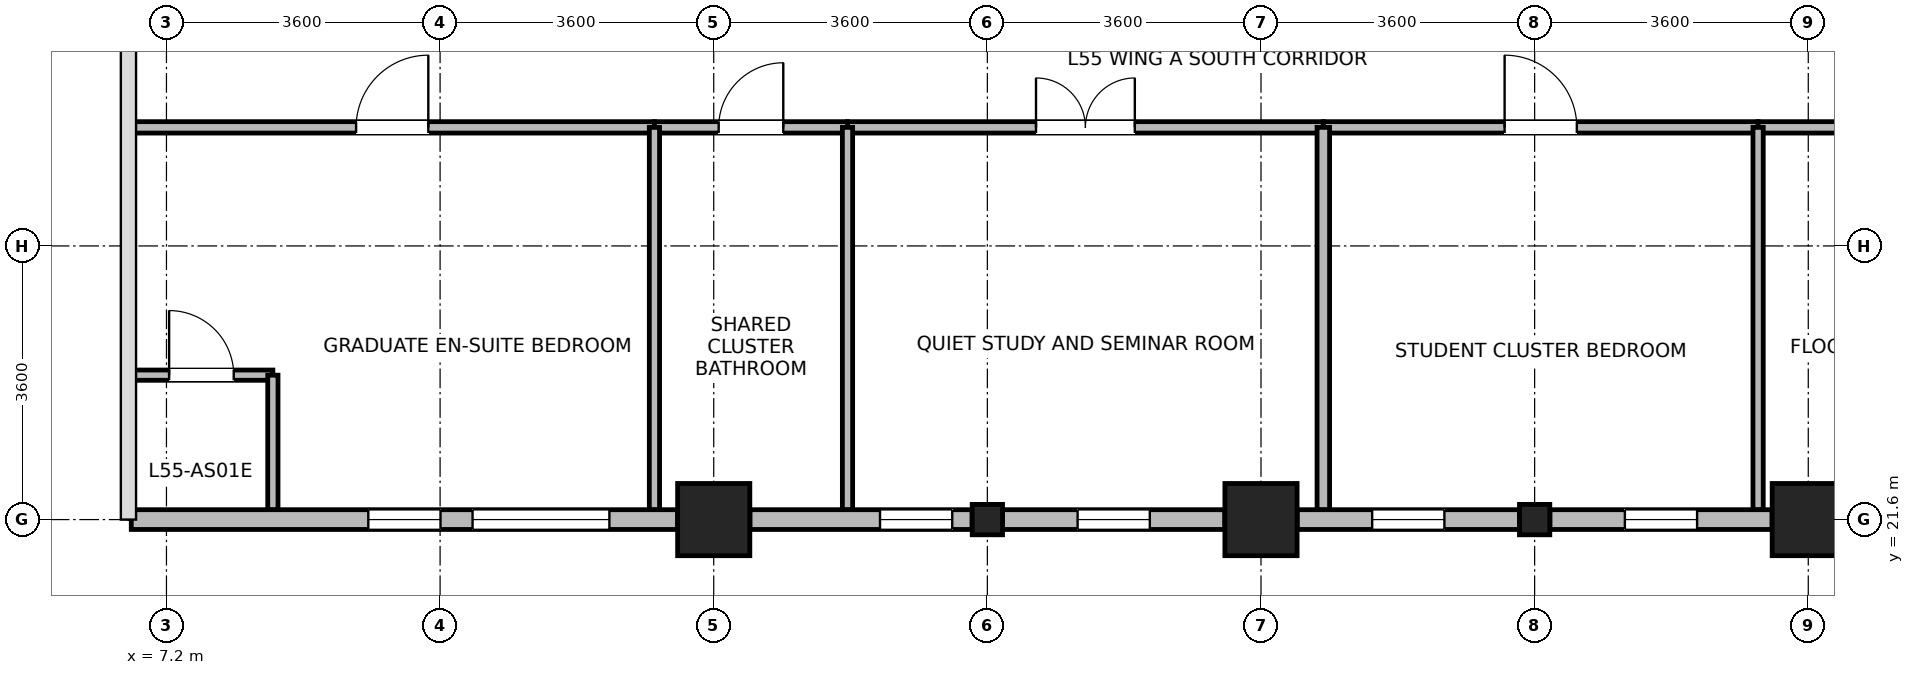
"""IFC4 building model, lengths in metres.
Left out: names, types, materials, properties, quantities, classifications, styles, units other than length and angle.
Written with IfcOpenShell. Run it as: python <this file> out.ifc"""

import sys

from ifc_helpers import new_model, si_unit, direction, frame, frame_2d, origin, origin_2d, place, context, subcontext, project, spatial, rectangle, i_section, extrude, source, transform, mapped, element, fill, save


model = new_model("IFC4")
c1 = context("Model", 3, precision=1e-05, world=origin(), true_north=direction((0.0, 1.0)))
c2 = subcontext(c1, "Body", "Model", "MODEL_VIEW")
j1 = project(units=[si_unit("LENGTHUNIT", "METRE"), si_unit("PLANEANGLEUNIT", "RADIAN")], contexts=[c1])
p1 = place(None, origin())
s1 = spatial("IfcSite", under=j1, at=p1, CompositionType="ELEMENT")
p2 = place(p1, origin())
s2 = spatial("IfcBuilding", under=s1, at=p2, CompositionType="ELEMENT")
p3 = place(p2, frame((0.0, 0.0, 216.6)))
s3 = spatial("IfcBuildingStorey", under=s2, at=p3, CompositionType="ELEMENT", Elevation=216.6)
m1 = source(origin(), c2, "Body", "SweptSolid", [
    extrude(rectangle(XDim=0.95, YDim=0.95, at=origin_2d()), origin(), (0.0, 0.0, 1.0), 3.7),
])
for number, where, z_axis, x_axis in (
    (1, (14.4, 21.6, 0.0), (0.0, 0.0, 1.0), (1.0, 0.0, 0.0)),
    (2, (21.6, 21.6, 0.0), (0.0, 0.0, 1.0), (1.0, 0.0, 0.0)),
    (3, (28.8, 21.6, 0.0), (0.0, 0.0, 1.0), (1.0, 0.0, 0.0)),
):
    element("IfcColumn", number, at=place(p3, frame(where, z_axis=z_axis, x_axis=x_axis)), inside=s3, PredefinedType="COLUMN", context=c2, shape_type="MappedRepresentation", body=[
        mapped(m1, transform((0.0, 0.0, 0.0), x_axis=(1.0, 0.0, 0.0), y_axis=(0.0, 1.0, 0.0), z_axis=(0.0, 0.0, 1.0), scale=1.0)),
    ])
m2 = source(origin(), c2, "Body", "SweptSolid", [
    extrude(i_section(OverallWidth=0.399, OverallDepth=0.4, WebThickness=0.017, FlangeThickness=0.023, FilletRadius=0.015, at=origin_2d()), origin(), (0.0, 0.0, 1.0), 3.7),
])
for number, where, z_axis, x_axis in (
    (4, (18.0, 21.6, 0.0), (0.0, 0.0, 1.0), (1.0, 0.0, 0.0)),
    (5, (25.2, 21.6, 0.0), (0.0, 0.0, 1.0), (1.0, 0.0, 0.0)),
):
    element("IfcColumn", number, at=place(p3, frame(where, z_axis=z_axis, x_axis=x_axis)), inside=s3, PredefinedType="COLUMN", context=c2, shape_type="MappedRepresentation", body=[
        mapped(m2, transform((0.0, 0.0, 0.0), x_axis=(1.0, 0.0, 0.0), y_axis=(0.0, 1.0, 0.0), z_axis=(0.0, 0.0, 1.0), scale=1.0)),
    ])
p4 = place(p3, frame((13.924, 21.6, 0.0), z_axis=(0.0, 0.0, 1.0), x_axis=(-1.0, 0.0, 0.0)))
e6 = element("IfcWall", 6, at=p4, inside=s3, PredefinedType="STANDARD", context=c2, shape_type="SweptSolid", body=[
    extrude(rectangle(XDim=7.187, YDim=0.26, at=frame_2d((3.594, 0.0))), origin(), (0.0, 0.0, 1.0), 3.45),
])
p5 = place(p4, frame((0.897, 0.0, 0.85)))
e7 = element("IfcOpeningElement", 7, at=p5, cuts=e6, PredefinedType="OPENING", context=c2, shape_type="SweptSolid", body=[
    extrude(rectangle(XDim=1.8, YDim=1.85, at=frame_2d((0.9, 0.925))), frame((0.0, 0.14, 0.0), z_axis=(0.0, -1.0, 0.0), x_axis=(1.0, 0.0, 0.0)), (0.0, 0.0, 1.0), 0.28),
])
p6 = place(p4, frame((3.118, 0.0, 0.85)))
e8 = element("IfcOpeningElement", 8, at=p6, cuts=e6, PredefinedType="OPENING", context=c2, shape_type="SweptSolid", body=[
    extrude(rectangle(XDim=0.95, YDim=1.75, at=frame_2d((0.475, 0.875))), frame((0.0, 0.14, 0.0), z_axis=(0.0, -1.0, 0.0), x_axis=(1.0, 0.0, 0.0)), (0.0, 0.0, 1.0), 0.28),
])
p7 = place(p3, frame((17.8, 21.6, 0.0), z_axis=(0.0, 0.0, 1.0), x_axis=(-1.0, 0.0, 0.0)))
e9 = element("IfcWall", 9, at=p7, inside=s3, PredefinedType="STANDARD", context=c2, shape_type="SweptSolid", body=[
    extrude(rectangle(XDim=2.924, YDim=0.26, at=frame_2d((1.462, 0.0))), origin(), (0.0, 0.0, 1.0), 3.05),
])
p8 = place(p7, frame((0.262, 0.0, 0.85)))
e10 = element("IfcOpeningElement", 10, at=p8, cuts=e9, PredefinedType="OPENING", context=c2, shape_type="SweptSolid", body=[
    extrude(rectangle(XDim=0.95, YDim=1.75, at=frame_2d((0.475, 0.875))), frame((0.0, 0.14, 0.0), z_axis=(0.0, -1.0, 0.0), x_axis=(1.0, 0.0, 0.0)), (0.0, 0.0, 1.0), 0.28),
])
p9 = place(p3, frame((21.124, 21.6, 0.0), z_axis=(0.0, 0.0, 1.0), x_axis=(-1.0, 0.0, 0.0)))
e11 = element("IfcWall", 11, at=p9, inside=s3, PredefinedType="STANDARD", context=c2, shape_type="SweptSolid", body=[
    extrude(rectangle(XDim=2.924, YDim=0.26, at=frame_2d((1.462, 0.0))), origin(), (0.0, 0.0, 1.0), 3.05),
])
p10 = place(p9, frame((0.987, 0.0, 0.85)))
e12 = element("IfcOpeningElement", 12, at=p10, cuts=e11, PredefinedType="OPENING", context=c2, shape_type="SweptSolid", body=[
    extrude(rectangle(XDim=0.95, YDim=1.75, at=frame_2d((0.475, 0.875))), frame((0.0, 0.14, 0.0), z_axis=(0.0, -1.0, 0.0), x_axis=(1.0, 0.0, 0.0)), (0.0, 0.0, 1.0), 0.28),
])
p11 = place(p3, frame((25.0, 21.6, 0.0), z_axis=(0.0, 0.0, 1.0), x_axis=(-1.0, 0.0, 0.0)))
e13 = element("IfcWall", 13, at=p11, inside=s3, PredefinedType="STANDARD", context=c2, shape_type="SweptSolid", body=[
    extrude(rectangle(XDim=2.924, YDim=0.26, at=frame_2d((1.462, 0.0))), origin(), (0.0, 0.0, 1.0), 3.05),
])
p12 = place(p11, frame((0.987, 0.0, 0.85)))
e14 = element("IfcOpeningElement", 14, at=p12, cuts=e13, PredefinedType="OPENING", context=c2, shape_type="SweptSolid", body=[
    extrude(rectangle(XDim=0.95, YDim=1.75, at=frame_2d((0.475, 0.875))), frame((0.0, 0.14, 0.0), z_axis=(0.0, -1.0, 0.0), x_axis=(1.0, 0.0, 0.0)), (0.0, 0.0, 1.0), 0.28),
])
p13 = place(p3, frame((28.324, 21.6, 0.0), z_axis=(0.0, 0.0, 1.0), x_axis=(-1.0, 0.0, 0.0)))
e15 = element("IfcWall", 15, at=p13, inside=s3, PredefinedType="STANDARD", context=c2, shape_type="SweptSolid", body=[
    extrude(rectangle(XDim=2.924, YDim=0.26, at=frame_2d((1.462, 0.0))), origin(), (0.0, 0.0, 1.0), 3.05),
])
p14 = place(p13, frame((0.987, 0.0, 0.85)))
e16 = element("IfcOpeningElement", 16, at=p14, cuts=e15, PredefinedType="OPENING", context=c2, shape_type="SweptSolid", body=[
    extrude(rectangle(XDim=0.95, YDim=1.75, at=frame_2d((0.475, 0.875))), frame((0.0, 0.14, 0.0), z_axis=(0.0, -1.0, 0.0), x_axis=(1.0, 0.0, 0.0)), (0.0, 0.0, 1.0), 0.28),
])
p15 = place(p3, frame((6.72, 23.5, 0.0), z_axis=(0.0, 0.0, 1.0), x_axis=(1.0, 0.0, 0.0)))
e17 = element("IfcWall", 17, at=p15, inside=s3, PredefinedType="PARTITIONING", context=c2, shape_type="SweptSolid", body=[
    extrude(rectangle(XDim=1.88, YDim=0.135, at=frame_2d((0.94, 0.0))), origin(), (0.0, 0.0, 1.0), 3.45),
])
p16 = place(p15, frame((0.515, 0.0, 0.0)))
e18 = element("IfcOpeningElement", 18, at=p16, cuts=e17, PredefinedType="OPENING", context=c2, shape_type="SweptSolid", body=[
    extrude(rectangle(XDim=0.85, YDim=2.04, at=frame_2d((0.425, 1.02))), frame((0.0, 0.078, 0.0), z_axis=(0.0, -1.0, 0.0), x_axis=(1.0, 0.0, 0.0)), (0.0, 0.0, 1.0), 0.155),
])
p17 = place(p3, frame((8.6, 21.732, 0.0), z_axis=(0.0, 0.0, 1.0), x_axis=(0.0, 1.0, 0.0)))
e19 = element("IfcWall", 19, at=p17, inside=s3, PredefinedType="PARTITIONING", context=c2, shape_type="SweptSolid", body=[
    extrude(rectangle(XDim=1.768, YDim=0.135, at=frame_2d((0.884, 0.0))), origin(), (0.0, 0.0, 1.0), 3.45),
])
p18 = place(p3, frame((6.72, 26.76, 0.0), z_axis=(0.0, 0.0, 1.0), x_axis=(1.0, 0.0, 0.0)))
e20 = element("IfcWall", 20, at=p18, inside=s3, PredefinedType="PARTITIONING", context=c2, shape_type="SweptSolid", body=[
    extrude(rectangle(XDim=6.9, YDim=0.15, at=frame_2d((3.45, 0.0))), origin(), (0.0, 0.0, 1.0), 3.45),
])
p19 = place(p18, frame((2.975, 0.0, 0.0)))
e21 = element("IfcOpeningElement", 21, at=p19, cuts=e20, PredefinedType="OPENING", context=c2, shape_type="SweptSolid", body=[
    extrude(rectangle(XDim=0.95, YDim=2.1, at=frame_2d((0.475, 1.05))), frame((0.0, 0.085, 0.0), z_axis=(0.0, -1.0, 0.0), x_axis=(1.0, 0.0, 0.0)), (0.0, 0.0, 1.0), 0.17),
])
p20 = place(p3, frame((16.16, 26.76, 0.0), z_axis=(0.0, 0.0, 1.0), x_axis=(1.0, 0.0, 0.0)))
e22 = element("IfcWall", 22, at=p20, inside=s3, PredefinedType="PARTITIONING", context=c2, shape_type="SweptSolid", body=[
    extrude(rectangle(XDim=6.26, YDim=0.15, at=frame_2d((3.13, 0.0))), origin(), (0.0, 0.0, 1.0), 3.45),
])
p21 = place(p20, frame((2.48, 0.0, 0.0)))
e23 = element("IfcOpeningElement", 23, at=p21, cuts=e22, PredefinedType="OPENING", context=c2, shape_type="SweptSolid", body=[
    extrude(rectangle(XDim=1.3, YDim=2.12, at=frame_2d((0.65, 1.06))), frame((0.0, 0.085, 0.0), z_axis=(0.0, -1.0, 0.0), x_axis=(1.0, 0.0, 0.0)), (0.0, 0.0, 1.0), 0.17),
])
p22 = place(p3, frame((22.42, 26.76, 0.0), z_axis=(0.0, 0.0, 1.0), x_axis=(1.0, 0.0, 0.0)))
e24 = element("IfcWall", 24, at=p22, inside=s3, PredefinedType="PARTITIONING", context=c2, shape_type="SweptSolid", body=[
    extrude(rectangle(XDim=5.72, YDim=0.15, at=frame_2d((2.86, 0.0))), origin(), (0.0, 0.0, 1.0), 3.45),
])
p23 = place(p22, frame((2.385, 0.0, 0.0)))
e25 = element("IfcOpeningElement", 25, at=p23, cuts=e24, PredefinedType="OPENING", context=c2, shape_type="SweptSolid", body=[
    extrude(rectangle(XDim=0.95, YDim=2.1, at=frame_2d((0.475, 1.05))), frame((0.0, 0.085, 0.0), z_axis=(0.0, -1.0, 0.0), x_axis=(1.0, 0.0, 0.0)), (0.0, 0.0, 1.0), 0.17),
])
p24 = place(p3, frame((28.14, 26.76, 0.0), z_axis=(0.0, 0.0, 1.0), x_axis=(1.0, 0.0, 0.0)))
e26 = element("IfcWall", 26, at=p24, inside=s3, PredefinedType="PARTITIONING", context=c2, shape_type="SweptSolid", body=[
    extrude(rectangle(XDim=5.22, YDim=0.15, at=frame_2d((2.61, 0.0))), origin(), (0.0, 0.0, 1.0), 3.45),
])
p25 = place(p24, frame((2.185, 0.0, 0.0)))
e27 = element("IfcOpeningElement", 27, at=p25, cuts=e26, PredefinedType="OPENING", context=c2, shape_type="SweptSolid", body=[
    extrude(rectangle(XDim=0.85, YDim=2.04, at=frame_2d((0.425, 1.02))), frame((0.0, 0.085, 0.0), z_axis=(0.0, -1.0, 0.0), x_axis=(1.0, 0.0, 0.0)), (0.0, 0.0, 1.0), 0.17),
])
p26 = place(p3, frame((13.62, 26.76, 0.0), z_axis=(0.0, 0.0, 1.0), x_axis=(1.0, 0.0, 0.0)))
e28 = element("IfcWall", 28, at=p26, inside=s3, PredefinedType="PARTITIONING", context=c2, shape_type="SweptSolid", body=[
    extrude(rectangle(XDim=2.54, YDim=0.15, at=frame_2d((1.27, 0.0))), origin(), (0.0, 0.0, 1.0), 3.45),
])
p27 = place(p26, frame((0.845, 0.0, 0.0)))
e29 = element("IfcOpeningElement", 29, at=p27, cuts=e28, PredefinedType="OPENING", context=c2, shape_type="SweptSolid", body=[
    extrude(rectangle(XDim=0.85, YDim=2.04, at=frame_2d((0.425, 1.02))), frame((0.0, 0.085, 0.0), z_axis=(0.0, -1.0, 0.0), x_axis=(1.0, 0.0, 0.0)), (0.0, 0.0, 1.0), 0.17),
])
for number, where, z_axis, x_axis in (
    (30, (13.62, 21.732, 0.0), (0.0, 0.0, 1.0), (0.0, 1.0, 0.0)),
    (31, (16.16, 21.732, 0.0), (0.0, 0.0, 1.0), (0.0, 1.0, 0.0)),
):
    element("IfcWall", number, at=place(p3, frame(where, z_axis=z_axis, x_axis=x_axis)), inside=s3, PredefinedType="PARTITIONING", context=c2, shape_type="SweptSolid", body=[
        extrude(rectangle(XDim=5.028, YDim=0.135, at=frame_2d((2.514, 0.0))), origin(), (0.0, 0.0, 1.0), 3.45),
    ])
p28 = place(p3, frame((22.42, 21.732, 0.0), z_axis=(0.0, 0.0, 1.0), x_axis=(0.0, 1.0, 0.0)))
e32 = element("IfcWall", 32, at=p28, inside=s3, PredefinedType="PARTITIONING", context=c2, shape_type="SweptSolid", body=[
    extrude(rectangle(XDim=5.028, YDim=0.165, at=frame_2d((2.514, 0.0))), origin(), (0.0, 0.0, 1.0), 3.45),
])
p29 = place(p3, frame((28.14, 21.732, 0.0), z_axis=(0.0, 0.0, 1.0), x_axis=(0.0, 1.0, 0.0)))
e33 = element("IfcWall", 33, at=p29, inside=s3, PredefinedType="PARTITIONING", context=c2, shape_type="SweptSolid", body=[
    extrude(rectangle(XDim=5.028, YDim=0.135, at=frame_2d((2.514, 0.0))), origin(), (0.0, 0.0, 1.0), 3.45),
])
p30 = place(p5, origin())
e34 = element("IfcWindow", 34, at=p30, inside=s3, PartitioningType="SINGLE_PANEL", PredefinedType="WINDOW", context=c2, shape_type="SweptSolid", body=[
    extrude(rectangle(XDim=1.8, YDim=1.85, at=frame_2d((0.9, 0.925))), frame((0.0, 0.03, 0.0), z_axis=(0.0, -1.0, 0.0), x_axis=(1.0, 0.0, 0.0)), (0.0, 0.0, 1.0), 0.06),
])
fill(e7, e34)
p31 = place(p6, origin())
e35 = element("IfcWindow", 35, at=p31, inside=s3, PartitioningType="SINGLE_PANEL", PredefinedType="WINDOW", context=c2, shape_type="SweptSolid", body=[
    extrude(rectangle(XDim=0.95, YDim=1.75, at=frame_2d((0.475, 0.875))), frame((0.0, 0.03, 0.0), z_axis=(0.0, -1.0, 0.0), x_axis=(1.0, 0.0, 0.0)), (0.0, 0.0, 1.0), 0.06),
])
fill(e8, e35)
p32 = place(p8, origin())
e36 = element("IfcWindow", 36, at=p32, inside=s3, PartitioningType="SINGLE_PANEL", PredefinedType="WINDOW", context=c2, shape_type="SweptSolid", body=[
    extrude(rectangle(XDim=0.95, YDim=1.75, at=frame_2d((0.475, 0.875))), frame((0.0, 0.03, 0.0), z_axis=(0.0, -1.0, 0.0), x_axis=(1.0, 0.0, 0.0)), (0.0, 0.0, 1.0), 0.06),
])
fill(e10, e36)
p33 = place(p10, origin())
e37 = element("IfcWindow", 37, at=p33, inside=s3, PartitioningType="SINGLE_PANEL", PredefinedType="WINDOW", context=c2, shape_type="SweptSolid", body=[
    extrude(rectangle(XDim=0.95, YDim=1.75, at=frame_2d((0.475, 0.875))), frame((0.0, 0.03, 0.0), z_axis=(0.0, -1.0, 0.0), x_axis=(1.0, 0.0, 0.0)), (0.0, 0.0, 1.0), 0.06),
])
fill(e12, e37)
p34 = place(p12, origin())
e38 = element("IfcWindow", 38, at=p34, inside=s3, PartitioningType="SINGLE_PANEL", PredefinedType="WINDOW", context=c2, shape_type="SweptSolid", body=[
    extrude(rectangle(XDim=0.95, YDim=1.75, at=frame_2d((0.475, 0.875))), frame((0.0, 0.03, 0.0), z_axis=(0.0, -1.0, 0.0), x_axis=(1.0, 0.0, 0.0)), (0.0, 0.0, 1.0), 0.06),
])
fill(e14, e38)
p35 = place(p14, origin())
e39 = element("IfcWindow", 39, at=p35, inside=s3, PartitioningType="SINGLE_PANEL", PredefinedType="WINDOW", context=c2, shape_type="SweptSolid", body=[
    extrude(rectangle(XDim=0.95, YDim=1.75, at=frame_2d((0.475, 0.875))), frame((0.0, 0.03, 0.0), z_axis=(0.0, -1.0, 0.0), x_axis=(1.0, 0.0, 0.0)), (0.0, 0.0, 1.0), 0.06),
])
fill(e16, e39)
p36 = place(p16, origin())
e40 = element("IfcDoor", 40, at=p36, inside=s3, OperationType="SINGLE_SWING_LEFT", PredefinedType="DOOR", context=c2, shape_type="SweptSolid", body=[
    extrude(rectangle(XDim=0.85, YDim=2.04, at=frame_2d((0.425, 1.02))), frame((0.0, 0.025, 0.0), z_axis=(0.0, -1.0, 0.0), x_axis=(1.0, 0.0, 0.0)), (0.0, 0.0, 1.0), 0.05),
])
fill(e18, e40)
p37 = place(p19, origin())
e41 = element("IfcDoor", 41, at=p37, inside=s3, OperationType="SINGLE_SWING_RIGHT", PredefinedType="DOOR", context=c2, shape_type="SweptSolid", body=[
    extrude(rectangle(XDim=0.95, YDim=2.1, at=frame_2d((0.475, 1.05))), frame((0.0, 0.025, 0.0), z_axis=(0.0, -1.0, 0.0), x_axis=(1.0, 0.0, 0.0)), (0.0, 0.0, 1.0), 0.05),
])
fill(e21, e41)
p38 = place(p21, origin())
e42 = element("IfcDoor", 42, at=p38, inside=s3, OperationType="DOUBLE_DOOR_SINGLE_SWING", PredefinedType="DOOR", context=c2, shape_type="SweptSolid", body=[
    extrude(rectangle(XDim=1.3, YDim=2.12, at=frame_2d((0.65, 1.06))), frame((0.0, 0.025, 0.0), z_axis=(0.0, -1.0, 0.0), x_axis=(1.0, 0.0, 0.0)), (0.0, 0.0, 1.0), 0.05),
])
fill(e23, e42)
p39 = place(p23, origin())
e43 = element("IfcDoor", 43, at=p39, inside=s3, OperationType="SINGLE_SWING_LEFT", PredefinedType="DOOR", context=c2, shape_type="SweptSolid", body=[
    extrude(rectangle(XDim=0.95, YDim=2.1, at=frame_2d((0.475, 1.05))), frame((0.0, 0.025, 0.0), z_axis=(0.0, -1.0, 0.0), x_axis=(1.0, 0.0, 0.0)), (0.0, 0.0, 1.0), 0.05),
])
fill(e25, e43)
p40 = place(p27, origin())
e44 = element("IfcDoor", 44, at=p40, inside=s3, OperationType="SINGLE_SWING_RIGHT", PredefinedType="DOOR", context=c2, shape_type="SweptSolid", body=[
    extrude(rectangle(XDim=0.85, YDim=2.04, at=frame_2d((0.425, 1.02))), frame((0.0, 0.025, 0.0), z_axis=(0.0, -1.0, 0.0), x_axis=(1.0, 0.0, 0.0)), (0.0, 0.0, 1.0), 0.05),
])
fill(e29, e44)
save(model, sys.argv[1])
